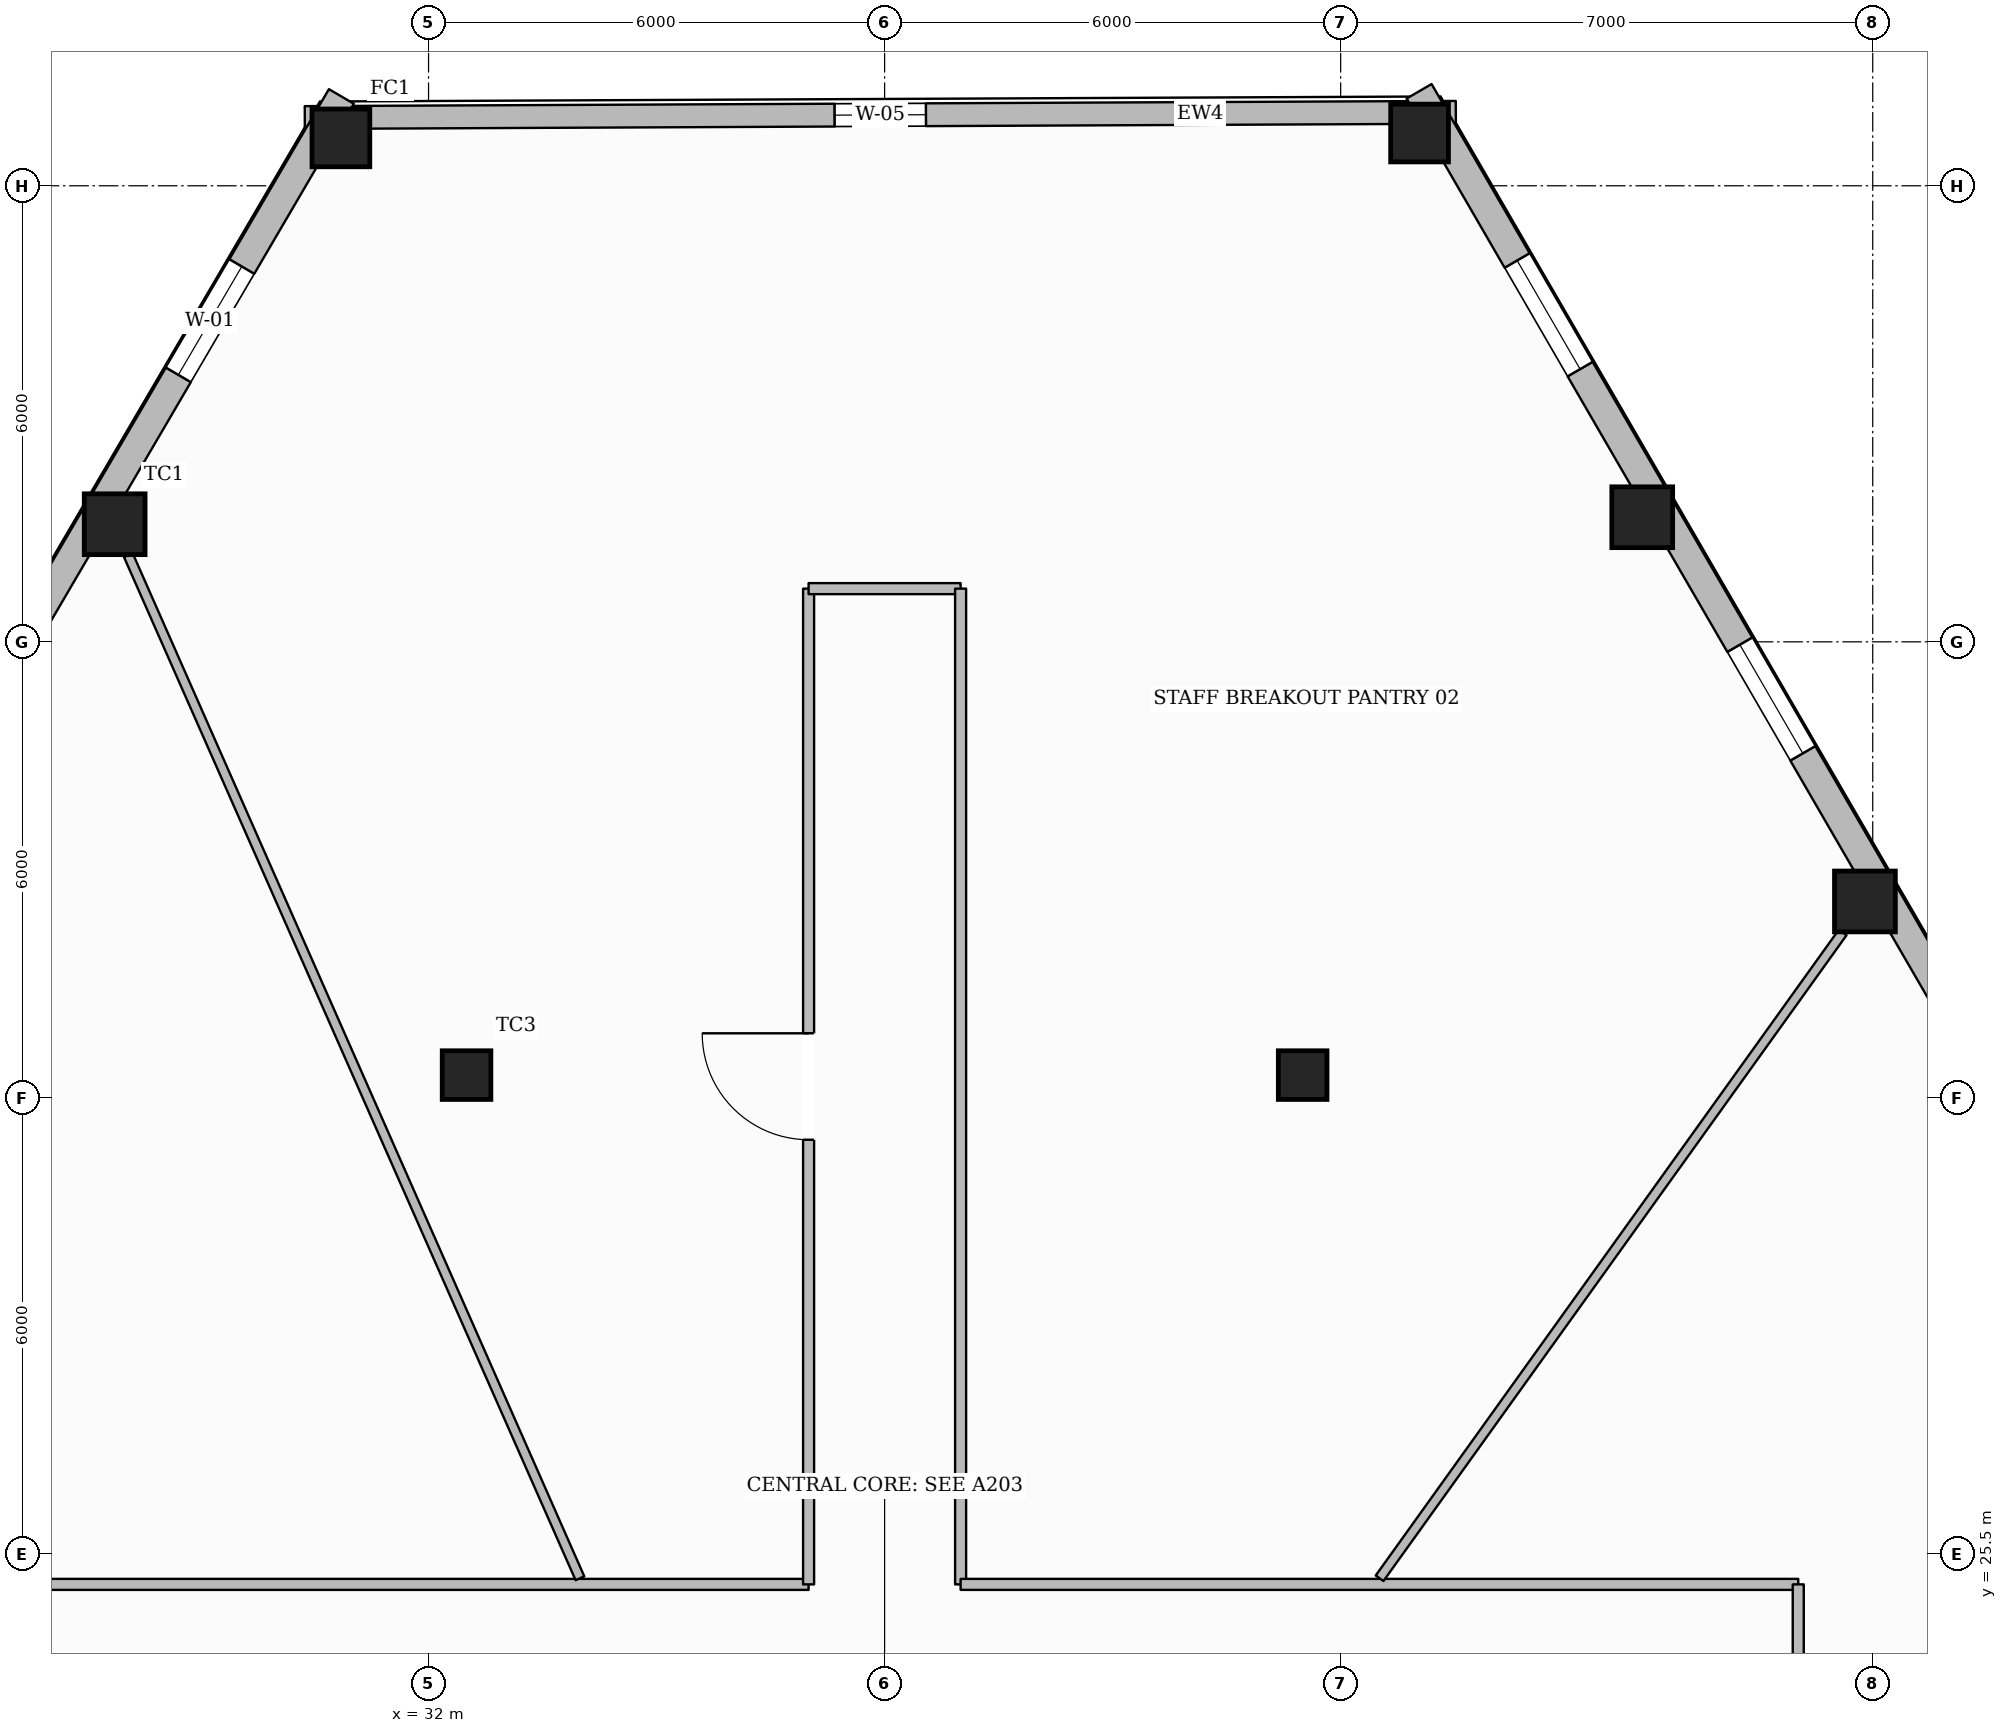
"""IFC4 building model, lengths in metres.
Left out: names, types, materials, properties, quantities, classifications, styles, units other than length and angle.
Written with IfcOpenShell. Run it as: python <this file> out.ifc"""

import sys

from ifc_helpers import new_model, si_unit, direction, frame, frame_2d, origin, origin_2d, place, context, subcontext, project, spatial, rectangle, hollow_rectangle, extrude, element, fill, save


model = new_model("IFC4")
c1 = context("Model", 3, precision=1e-05, world=origin(), true_north=direction((0.0, 1.0)))
c2 = subcontext(c1, "Body", "Model", "MODEL_VIEW")
j1 = project(units=[si_unit("LENGTHUNIT", "METRE"), si_unit("PLANEANGLEUNIT", "RADIAN")], contexts=[c1])
p1 = place(None, origin())
s1 = spatial("IfcSite", under=j1, at=p1, CompositionType="ELEMENT")
p2 = place(p1, origin())
s2 = spatial("IfcBuilding", under=s1, at=p2, CompositionType="ELEMENT")
p3 = place(p2, frame((0.0, 0.0, 67.6)))
s3 = spatial("IfcBuildingStorey", under=s2, at=p3, CompositionType="ELEMENT", Elevation=67.6)
p4 = place(p3, frame((30.847, 44.13, 0.0), z_axis=(0.0, 0.0, 1.0), x_axis=(1.0, 0.0, 0.0)))
e1 = element("IfcColumn", 1, at=p4, inside=s3, PredefinedType="COLUMN", context=c2, shape_type="SweptSolid", body=[
    extrude(hollow_rectangle(XDim=0.76, YDim=0.76, WallThickness=0.035, at=origin_2d()), origin(), (0.0, 0.0, 1.0), 3.59),
])
for number, where, z_axis, x_axis in (
    (2, (27.871, 39.047, 0.0), (0.0, 0.0, 1.0), (1.0, 0.0, 0.0)),
    (3, (50.897, 34.084, 0.0), (0.0, 0.0, 1.0), (1.0, 0.0, 0.0)),
    (4, (47.968, 39.139, 0.0), (0.0, 0.0, 1.0), (1.0, 0.0, 0.0)),
):
    element("IfcColumn", number, at=place(p3, frame(where, z_axis=z_axis, x_axis=x_axis)), inside=s3, PredefinedType="COLUMN", context=c2, shape_type="SweptSolid", body=[
        extrude(hollow_rectangle(XDim=0.8, YDim=0.8, WallThickness=0.036, at=origin_2d()), origin(), (0.0, 0.0, 1.0), 3.59),
    ])
p5 = place(p3, frame((45.038, 44.194, 0.0), z_axis=(0.0, 0.0, 1.0), x_axis=(1.0, 0.0, 0.0)))
e5 = element("IfcColumn", 5, at=p5, inside=s3, PredefinedType="COLUMN", context=c2, shape_type="SweptSolid", body=[
    extrude(hollow_rectangle(XDim=0.76, YDim=0.76, WallThickness=0.035, at=origin_2d()), origin(), (0.0, 0.0, 1.0), 3.59),
])
for number, where, z_axis, x_axis in (
    (6, (32.5, 31.8, 0.0), (0.0, 0.0, 1.0), (1.0, 0.0, 0.0)),
    (7, (43.5, 31.8, 0.0), (0.0, 0.0, 1.0), (1.0, 0.0, 0.0)),
):
    element("IfcColumn", number, at=place(p3, frame(where, z_axis=z_axis, x_axis=x_axis)), inside=s3, PredefinedType="COLUMN", context=c2, shape_type="SweptSolid", body=[
        extrude(hollow_rectangle(XDim=0.64, YDim=0.64, WallThickness=0.028, at=origin_2d()), origin(), (0.0, 0.0, 1.0), 3.59),
    ])
p6 = place(p3, frame((30.372, 44.398, 0.0), z_axis=(0.0, 0.0, 1.0), x_axis=(0.999989810993, 0.00451418997, 0.0)))
e8 = element("IfcWall", 8, at=p6, inside=s3, PredefinedType="STANDARD", context=c2, shape_type="SweptSolid", body=[
    extrude(rectangle(XDim=15.143, YDim=0.3, at=frame_2d((7.572, 0.0))), origin(), (0.0, 0.0, 1.0), 2.97),
])
p7 = place(p6, frame((6.971, 0.0, 0.65)))
e9 = element("IfcOpeningElement", 9, at=p7, cuts=e8, PredefinedType="OPENING", context=c2, shape_type="SweptSolid", body=[
    extrude(rectangle(XDim=1.2, YDim=1.7, at=frame_2d((0.6, 0.85))), frame((0.0, 0.16, 0.0), z_axis=(0.0, -1.0, 0.0), x_axis=(1.0, 0.0, 0.0)), (0.0, 0.0, 1.0), 0.32),
])
p8 = place(p3, frame((12.513, 13.357, 0.0), z_axis=(0.0, 0.0, 1.0), x_axis=(0.505335851503, 0.862922752734, 0.0)))
e10 = element("IfcWall", 10, at=p8, inside=s3, PredefinedType="STANDARD", context=c2, shape_type="SweptSolid", body=[
    extrude(rectangle(XDim=36.293, YDim=0.38, at=frame_2d((18.147, 0.0))), origin(), (0.0, 0.0, 1.0), 2.97),
])
p9 = place(p8, frame((32.05, 0.0, 0.65)))
e11 = element("IfcOpeningElement", 11, at=p9, cuts=e10, PredefinedType="OPENING", context=c2, shape_type="SweptSolid", body=[
    extrude(rectangle(XDim=1.65, YDim=1.75, at=frame_2d((0.825, 0.875))), frame((0.0, 0.2, 0.0), z_axis=(0.0, -1.0, 0.0), x_axis=(1.0, 0.0, 0.0)), (0.0, 0.0, 1.0), 0.4),
])
p10 = place(p8, frame((26.159, 0.0, 0.65)))
e12 = element("IfcOpeningElement", 12, at=p10, cuts=e10, PredefinedType="OPENING", context=c2, shape_type="SweptSolid", body=[
    extrude(rectangle(XDim=1.65, YDim=1.75, at=frame_2d((0.825, 0.875))), frame((0.0, 0.2, 0.0), z_axis=(0.0, -1.0, 0.0), x_axis=(1.0, 0.0, 0.0)), (0.0, 0.0, 1.0), 0.4),
])
p11 = place(p8, frame((8.49, 0.0, 0.65)))
e13 = element("IfcOpeningElement", 13, at=p11, cuts=e10, PredefinedType="OPENING", context=c2, shape_type="SweptSolid", body=[
    extrude(rectangle(XDim=1.65, YDim=1.75, at=frame_2d((0.825, 0.875))), frame((0.0, 0.2, 0.0), z_axis=(0.0, -1.0, 0.0), x_axis=(1.0, 0.0, 0.0)), (0.0, 0.0, 1.0), 0.4),
])
p12 = place(p8, frame((2.6, 0.0, 0.65)))
e14 = element("IfcOpeningElement", 14, at=p12, cuts=e10, PredefinedType="OPENING", context=c2, shape_type="SweptSolid", body=[
    extrude(rectangle(XDim=1.65, YDim=1.75, at=frame_2d((0.825, 0.875))), frame((0.0, 0.2, 0.0), z_axis=(0.0, -1.0, 0.0), x_axis=(1.0, 0.0, 0.0)), (0.0, 0.0, 1.0), 0.4),
])
p13 = place(p3, frame((45.032, 44.743, 0.0), z_axis=(0.0, 0.0, 1.0), x_axis=(0.501444024373, -0.865190089183, 0.0)))
e15 = element("IfcWall", 15, at=p13, inside=s3, PredefinedType="STANDARD", context=c2, shape_type="SweptSolid", body=[
    extrude(rectangle(XDim=36.012, YDim=0.38, at=frame_2d((18.006, 0.0))), origin(), (0.0, 0.0, 1.0), 2.97),
])
p14 = place(p13, frame((31.786, 0.0, 0.65)))
e16 = element("IfcOpeningElement", 16, at=p14, cuts=e15, PredefinedType="OPENING", context=c2, shape_type="SweptSolid", body=[
    extrude(rectangle(XDim=1.65, YDim=1.75, at=frame_2d((0.825, 0.875))), frame((0.0, 0.2, 0.0), z_axis=(0.0, -1.0, 0.0), x_axis=(1.0, 0.0, 0.0)), (0.0, 0.0, 1.0), 0.4),
])
p15 = place(p13, frame((25.944, 0.0, 0.65)))
e17 = element("IfcOpeningElement", 17, at=p15, cuts=e15, PredefinedType="OPENING", context=c2, shape_type="SweptSolid", body=[
    extrude(rectangle(XDim=1.65, YDim=1.75, at=frame_2d((0.825, 0.875))), frame((0.0, 0.2, 0.0), z_axis=(0.0, -1.0, 0.0), x_axis=(1.0, 0.0, 0.0)), (0.0, 0.0, 1.0), 0.4),
])
p16 = place(p13, frame((14.259, 0.0, 0.65)))
e18 = element("IfcOpeningElement", 18, at=p16, cuts=e15, PredefinedType="OPENING", context=c2, shape_type="SweptSolid", body=[
    extrude(rectangle(XDim=1.65, YDim=1.75, at=frame_2d((0.825, 0.875))), frame((0.0, 0.2, 0.0), z_axis=(0.0, -1.0, 0.0), x_axis=(1.0, 0.0, 0.0)), (0.0, 0.0, 1.0), 0.4),
])
p17 = place(p13, frame((8.417, 0.0, 0.65)))
e19 = element("IfcOpeningElement", 19, at=p17, cuts=e15, PredefinedType="OPENING", context=c2, shape_type="SweptSolid", body=[
    extrude(rectangle(XDim=1.65, YDim=1.75, at=frame_2d((0.825, 0.875))), frame((0.0, 0.2, 0.0), z_axis=(0.0, -1.0, 0.0), x_axis=(1.0, 0.0, 0.0)), (0.0, 0.0, 1.0), 0.4),
])
p18 = place(p13, frame((2.574, 0.0, 0.65)))
e20 = element("IfcOpeningElement", 20, at=p18, cuts=e15, PredefinedType="OPENING", context=c2, shape_type="SweptSolid", body=[
    extrude(rectangle(XDim=1.65, YDim=1.75, at=frame_2d((0.825, 0.875))), frame((0.0, 0.2, 0.0), z_axis=(0.0, -1.0, 0.0), x_axis=(1.0, 0.0, 0.0)), (0.0, 0.0, 1.0), 0.4),
])
p19 = place(p3, frame((25.98, 25.1, 0.0), z_axis=(0.0, 0.0, 1.0), x_axis=(1.0, 0.0, 0.0)))
e21 = element("IfcWall", 21, at=p19, inside=s3, PredefinedType="PARTITIONING", context=c2, shape_type="SweptSolid", body=[
    extrude(rectangle(XDim=11.02, YDim=0.145, at=frame_2d((5.51, 0.0))), origin(), (0.0, 0.0, 1.0), 3.59),
])
p20 = place(p3, frame((37.0, 25.1, 0.0), z_axis=(0.0, 0.0, 1.0), x_axis=(0.0, 1.0, 0.0)))
e22 = element("IfcWall", 22, at=p20, inside=s3, PredefinedType="PARTITIONING", context=c2, shape_type="SweptSolid", body=[
    extrude(rectangle(XDim=13.1, YDim=0.145, at=frame_2d((6.55, 0.0))), origin(), (0.0, 0.0, 1.0), 3.59),
])
p21 = place(p20, frame((5.85, 0.0, 0.0)))
e23 = element("IfcOpeningElement", 23, at=p21, cuts=e22, PredefinedType="OPENING", context=c2, shape_type="SweptSolid", body=[
    extrude(rectangle(XDim=1.4, YDim=2.2, at=frame_2d((0.7, 1.1))), frame((0.0, 0.083, 0.0), z_axis=(0.0, -1.0, 0.0), x_axis=(1.0, 0.0, 0.0)), (0.0, 0.0, 1.0), 0.165),
])
p22 = place(p3, frame((37.0, 38.2, 0.0), z_axis=(0.0, 0.0, 1.0), x_axis=(1.0, 0.0, 0.0)))
e24 = element("IfcWall", 24, at=p22, inside=s3, PredefinedType="PARTITIONING", context=c2, shape_type="SweptSolid", body=[
    extrude(rectangle(XDim=2.0, YDim=0.145, at=frame_2d((1.0, 0.0))), origin(), (0.0, 0.0, 1.0), 3.278),
])
p23 = place(p3, frame((39.0, 38.2, 0.0), z_axis=(0.0, 0.0, 1.0), x_axis=(0.0, -1.0, 0.0)))
e25 = element("IfcWall", 25, at=p23, inside=s3, PredefinedType="PARTITIONING", context=c2, shape_type="SweptSolid", body=[
    extrude(rectangle(XDim=13.1, YDim=0.145, at=frame_2d((6.55, 0.0))), origin(), (0.0, 0.0, 1.0), 3.59),
])
p24 = place(p3, frame((39.0, 25.1, 0.0), z_axis=(0.0, 0.0, 1.0), x_axis=(1.0, 0.0, 0.0)))
e26 = element("IfcWall", 26, at=p24, inside=s3, PredefinedType="PARTITIONING", context=c2, shape_type="SweptSolid", body=[
    extrude(rectangle(XDim=11.02, YDim=0.145, at=frame_2d((5.51, 0.0))), origin(), (0.0, 0.0, 1.0), 3.59),
])
p25 = place(p3, frame((50.02, 25.1, 0.0), z_axis=(0.0, 0.0, 1.0), x_axis=(0.0, -1.0, 0.0)))
e27 = element("IfcWall", 27, at=p25, inside=s3, PredefinedType="PARTITIONING", context=c2, shape_type="SweptSolid", body=[
    extrude(rectangle(XDim=16.0, YDim=0.145, at=frame_2d((8.0, 0.0))), origin(), (0.0, 0.0, 1.0), 3.278),
])
p26 = place(p25, frame((3.098, 0.0, 0.0)))
e28 = element("IfcOpeningElement", 28, at=p26, cuts=e27, PredefinedType="OPENING", context=c2, shape_type="SweptSolid", body=[
    extrude(rectangle(XDim=1.4, YDim=2.2, at=frame_2d((0.7, 1.1))), frame((0.0, 0.083, 0.0), z_axis=(0.0, -1.0, 0.0), x_axis=(1.0, 0.0, 0.0)), (0.0, 0.0, 1.0), 0.165),
])
p27 = place(p25, frame((10.927, 0.0, 0.0)))
e29 = element("IfcOpeningElement", 29, at=p27, cuts=e27, PredefinedType="OPENING", context=c2, shape_type="SweptSolid", body=[
    extrude(rectangle(XDim=1.4, YDim=2.2, at=frame_2d((0.7, 1.1))), frame((0.0, 0.083, 0.0), z_axis=(0.0, -1.0, 0.0), x_axis=(1.0, 0.0, 0.0)), (0.0, 0.0, 1.0), 0.165),
])
p28 = place(p3, frame((44.512, 25.18, 0.0), z_axis=(0.0, 0.0, 1.0), x_axis=(0.582750338363, 0.812651243239, 0.0)))
e30 = element("IfcWall", 30, at=p28, inside=s3, PredefinedType="PARTITIONING", context=c2, shape_type="SweptSolid", body=[
    extrude(rectangle(XDim=10.455, YDim=0.125, at=frame_2d((5.228, 0.0))), origin(), (0.0, 0.0, 1.0), 3.057),
])
p29 = place(p3, frame((33.992, 25.18, 0.0), z_axis=(0.0, 0.0, 1.0), x_axis=(-0.403832220448, 0.914833065498, 0.0)))
e31 = element("IfcWall", 31, at=p29, inside=s3, PredefinedType="PARTITIONING", context=c2, shape_type="SweptSolid", body=[
    extrude(rectangle(XDim=14.712, YDim=0.125, at=frame_2d((7.356, 0.0))), origin(), (0.0, 0.0, 1.0), 3.057),
])
p30 = place(p9, origin())
e32 = element("IfcWindow", 32, at=p30, inside=s3, PartitioningType="SINGLE_PANEL", PredefinedType="WINDOW", context=c2, shape_type="SweptSolid", body=[
    extrude(rectangle(XDim=1.65, YDim=1.75, at=frame_2d((0.825, 0.875))), frame((0.0, 0.03, 0.0), z_axis=(0.0, -1.0, 0.0), x_axis=(1.0, 0.0, 0.0)), (0.0, 0.0, 1.0), 0.06),
])
fill(e11, e32)
p31 = place(p17, origin())
e33 = element("IfcWindow", 33, at=p31, inside=s3, PartitioningType="SINGLE_PANEL", PredefinedType="WINDOW", context=c2, shape_type="SweptSolid", body=[
    extrude(rectangle(XDim=1.65, YDim=1.75, at=frame_2d((0.825, 0.875))), frame((0.0, 0.03, 0.0), z_axis=(0.0, -1.0, 0.0), x_axis=(1.0, 0.0, 0.0)), (0.0, 0.0, 1.0), 0.06),
])
fill(e19, e33)
p32 = place(p18, origin())
e34 = element("IfcWindow", 34, at=p32, inside=s3, PartitioningType="SINGLE_PANEL", PredefinedType="WINDOW", context=c2, shape_type="SweptSolid", body=[
    extrude(rectangle(XDim=1.65, YDim=1.75, at=frame_2d((0.825, 0.875))), frame((0.0, 0.03, 0.0), z_axis=(0.0, -1.0, 0.0), x_axis=(1.0, 0.0, 0.0)), (0.0, 0.0, 1.0), 0.06),
])
fill(e20, e34)
p33 = place(p7, origin())
e35 = element("IfcWindow", 35, at=p33, inside=s3, PartitioningType="SINGLE_PANEL", PredefinedType="WINDOW", context=c2, shape_type="SweptSolid", body=[
    extrude(rectangle(XDim=1.2, YDim=1.7, at=frame_2d((0.6, 0.85))), frame((0.0, 0.03, 0.0), z_axis=(0.0, -1.0, 0.0), x_axis=(1.0, 0.0, 0.0)), (0.0, 0.0, 1.0), 0.06),
])
fill(e9, e35)
p34 = place(p21, origin())
e36 = element("IfcDoor", 36, at=p34, inside=s3, OperationType="SINGLE_SWING_RIGHT", PredefinedType="DOOR", context=c2, shape_type="SweptSolid", body=[
    extrude(rectangle(XDim=1.4, YDim=2.2, at=frame_2d((0.7, 1.1))), frame((0.0, 0.025, 0.0), z_axis=(0.0, -1.0, 0.0), x_axis=(1.0, 0.0, 0.0)), (0.0, 0.0, 1.0), 0.05),
])
fill(e23, e36)
save(model, sys.argv[1])
